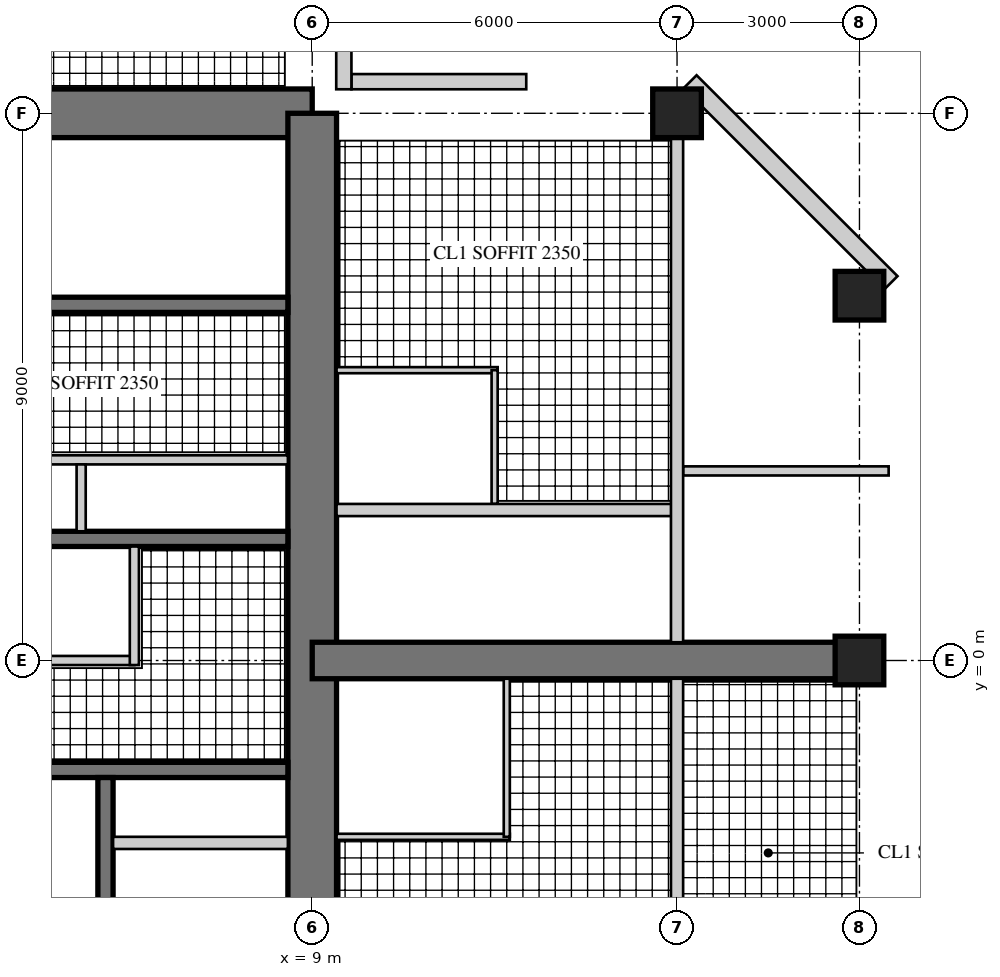
"""IFC4 building model, lengths in metres.
Left out: names, types, materials, properties, quantities, classifications, styles, units other than length and angle.
Written with IfcOpenShell. Run it as: python <this file> out.ifc"""

import sys

from ifc_helpers import new_model, si_unit, direction, frame, frame_2d, origin, origin_2d, place, context, subcontext, project, spatial, rectangle, hollow_rectangle, extrude, element, fill, save


model = new_model("IFC4")
c1 = context("Model", 3, precision=1e-05, world=origin(), true_north=direction((0.0, 1.0)))
c2 = subcontext(c1, "Body", "Model", "MODEL_VIEW")
j1 = project(units=[si_unit("LENGTHUNIT", "METRE"), si_unit("PLANEANGLEUNIT", "RADIAN")], contexts=[c1])
p1 = place(None, origin())
s1 = spatial("IfcSite", under=j1, at=p1, CompositionType="ELEMENT")
p2 = place(p1, origin())
s2 = spatial("IfcBuilding", under=s1, at=p2, CompositionType="ELEMENT")
p3 = place(p2, frame((0.0, 0.0, 225.5)))
s3 = spatial("IfcBuildingStorey", under=s2, at=p3, CompositionType="ELEMENT", Elevation=225.5)
p4 = place(p3, frame((9.0, 9.0, 0.0), z_axis=(0.0, 0.0, 1.0), x_axis=(-1.0, 0.0, 0.0)))
e1 = element("IfcWall", 1, at=p4, inside=s3, PredefinedType="SHEAR", context=c2, shape_type="SweptSolid", body=[
    extrude(rectangle(XDim=18.0, YDim=0.8, at=frame_2d((9.0, 0.0))), origin(), (0.0, 0.0, 1.0), 3.4),
])
p5 = place(p4, frame((9.8, 0.0, 0.0)))
e2 = element("IfcOpeningElement", 2, at=p5, cuts=e1, PredefinedType="OPENING", context=c2, shape_type="SweptSolid", body=[
    extrude(rectangle(XDim=1.0, YDim=2.4, at=frame_2d((0.5, 1.2))), frame((0.0, 0.41, 0.0), z_axis=(0.0, -1.0, 0.0), x_axis=(1.0, 0.0, 0.0)), (0.0, 0.0, 1.0), 0.82),
])
p6 = place(p3, frame((9.0, -9.0, 0.0), z_axis=(0.0, 0.0, 1.0), x_axis=(0.0, 1.0, 0.0)))
e3 = element("IfcWall", 3, at=p6, inside=s3, PredefinedType="SHEAR", context=c2, shape_type="SweptSolid", body=[
    extrude(rectangle(XDim=18.0, YDim=0.8, at=frame_2d((9.0, 0.0))), origin(), (0.0, 0.0, 1.0), 3.4),
])
p7 = place(p6, frame((9.8, 0.0, 0.0)))
e4 = element("IfcOpeningElement", 4, at=p7, cuts=e3, PredefinedType="OPENING", context=c2, shape_type="SweptSolid", body=[
    extrude(rectangle(XDim=1.0, YDim=2.4, at=frame_2d((0.5, 1.2))), frame((0.0, 0.41, 0.0), z_axis=(0.0, -1.0, 0.0), x_axis=(1.0, 0.0, 0.0)), (0.0, 0.0, 1.0), 0.82),
])
p8 = place(p3, frame((1.925, 2.0, 0.0), z_axis=(0.0, 0.0, 1.0), x_axis=(1.0, 0.0, 0.0)))
e5 = element("IfcWall", 5, at=p8, inside=s3, PredefinedType="SHEAR", context=c2, shape_type="SweptSolid", body=[
    extrude(rectangle(XDim=6.675, YDim=0.25, at=frame_2d((3.337, 0.0))), origin(), (0.0, 0.0, 1.0), 3.4),
])
p9 = place(p3, frame((1.925, 5.85, 0.0), z_axis=(0.0, 0.0, 1.0), x_axis=(1.0, 0.0, 0.0)))
e6 = element("IfcWall", 6, at=p9, inside=s3, PredefinedType="SHEAR", context=c2, shape_type="SweptSolid", body=[
    extrude(rectangle(XDim=6.675, YDim=0.25, at=frame_2d((3.337, 0.0))), origin(), (0.0, 0.0, 1.0), 3.4),
])
p10 = place(p9, frame((0.546, 0.0, 0.0)))
e7 = element("IfcOpeningElement", 7, at=p10, cuts=e6, PredefinedType="OPENING", context=c2, shape_type="SweptSolid", body=[
    extrude(rectangle(XDim=1.0, YDim=2.1, at=frame_2d((0.5, 1.05))), frame((0.0, 0.135, 0.0), z_axis=(0.0, -1.0, 0.0), x_axis=(1.0, 0.0, 0.0)), (0.0, 0.0, 1.0), 0.27),
])
p11 = place(p3, frame((1.925, 3.3, 0.0), z_axis=(0.0, 0.0, 1.0), x_axis=(1.0, 0.0, 0.0)))
e8 = element("IfcWall", 8, at=p11, inside=s3, PredefinedType="PARTITIONING", context=c2, shape_type="SweptSolid", body=[
    extrude(rectangle(XDim=6.675, YDim=0.15, at=frame_2d((3.337, 0.0))), origin(), (0.0, 0.0, 1.0), 3.4),
])
p12 = place(p11, frame((0.075, 0.0, 0.0)))
e9 = element("IfcOpeningElement", 9, at=p12, cuts=e8, PredefinedType="OPENING", context=c2, shape_type="SweptSolid", body=[
    extrude(rectangle(XDim=0.8, YDim=2.1, at=frame_2d((0.4, 1.05))), frame((0.0, 0.085, 0.0), z_axis=(0.0, -1.0, 0.0), x_axis=(1.0, 0.0, 0.0)), (0.0, 0.0, 1.0), 0.17),
])
p13 = place(p11, frame((3.675, 0.0, 0.0)))
e10 = element("IfcOpeningElement", 10, at=p13, cuts=e8, PredefinedType="OPENING", context=c2, shape_type="SweptSolid", body=[
    extrude(rectangle(XDim=0.8, YDim=2.1, at=frame_2d((0.4, 1.05))), frame((0.0, 0.085, 0.0), z_axis=(0.0, -1.0, 0.0), x_axis=(1.0, 0.0, 0.0)), (0.0, 0.0, 1.0), 0.17),
])
p14 = place(p3, frame((5.2, 2.125, 0.0), z_axis=(0.0, 0.0, 1.0), x_axis=(0.0, 1.0, 0.0)))
e11 = element("IfcWall", 11, at=p14, inside=s3, PredefinedType="PARTITIONING", context=c2, shape_type="SweptSolid", body=[
    extrude(rectangle(XDim=1.1, YDim=0.15, at=frame_2d((0.55, 0.0))), origin(), (0.0, 0.0, 1.0), 3.4),
])
p15 = place(p3, frame((2.125, -1.8, 0.0), z_axis=(0.0, 0.0, 1.0), x_axis=(1.0, 0.0, 0.0)))
e12 = element("IfcWall", 12, at=p15, inside=s3, PredefinedType="SHEAR", context=c2, shape_type="SweptSolid", body=[
    extrude(rectangle(XDim=6.475, YDim=0.25, at=frame_2d((3.238, 0.0))), origin(), (0.0, 0.0, 1.0), 3.4),
])
p16 = place(p3, frame((5.6, -1.925, 0.0), z_axis=(0.0, 0.0, 1.0), x_axis=(0.0, -1.0, 0.0)))
e13 = element("IfcWall", 13, at=p16, inside=s3, PredefinedType="SHEAR", context=c2, shape_type="SweptSolid", body=[
    extrude(rectangle(XDim=3.55, YDim=0.25, at=frame_2d((1.775, 0.0))), origin(), (0.0, 0.0, 1.0), 3.4),
])
p17 = place(p16, frame((1.525, 0.0, 0.0)))
e14 = element("IfcOpeningElement", 14, at=p17, cuts=e13, PredefinedType="OPENING", context=c2, shape_type="SweptSolid", body=[
    extrude(rectangle(XDim=1.1, YDim=2.2, at=frame_2d((0.55, 1.1))), frame((0.0, 0.135, 0.0), z_axis=(0.0, -1.0, 0.0), x_axis=(1.0, 0.0, 0.0)), (0.0, 0.0, 1.0), 0.27),
])
p18 = place(p16, frame((0.075, 0.0, 0.0)))
e15 = element("IfcOpeningElement", 15, at=p18, cuts=e13, PredefinedType="OPENING", context=c2, shape_type="SweptSolid", body=[
    extrude(rectangle(XDim=0.8, YDim=2.1, at=frame_2d((0.4, 1.05))), frame((0.0, 0.135, 0.0), z_axis=(0.0, -1.0, 0.0), x_axis=(1.0, 0.0, 0.0)), (0.0, 0.0, 1.0), 0.27),
])
p19 = place(p3, frame((5.725, -3.0, 0.0), z_axis=(0.0, 0.0, 1.0), x_axis=(1.0, 0.0, 0.0)))
e16 = element("IfcWall", 16, at=p19, inside=s3, PredefinedType="PARTITIONING", context=c2, shape_type="SweptSolid", body=[
    extrude(rectangle(XDim=2.875, YDim=0.2, at=frame_2d((1.438, 0.0))), origin(), (0.0, 0.0, 1.0), 3.4),
])
p20 = place(p3, frame((9.0, 0.0, 0.0), z_axis=(0.0, 0.0, 1.0), x_axis=(1.0, 0.0, 0.0)))
e17 = element("IfcWall", 17, at=p20, inside=s3, PredefinedType="SHEAR", context=c2, shape_type="SweptSolid", body=[
    extrude(rectangle(XDim=9.0, YDim=0.6, at=frame_2d((4.5, 0.0))), origin(), (0.0, 0.0, 1.0), 3.4),
])
p21 = place(p20, frame((3.8, 0.0, 0.0)))
e18 = element("IfcOpeningElement", 18, at=p21, cuts=e17, PredefinedType="OPENING", context=c2, shape_type="SweptSolid", body=[
    extrude(rectangle(XDim=1.0, YDim=2.15, at=frame_2d((0.5, 1.075))), frame((0.0, 0.31, 0.0), z_axis=(0.0, -1.0, 0.0), x_axis=(1.0, 0.0, 0.0)), (0.0, 0.0, 1.0), 0.62),
])
p22 = place(p20, frame((7.0, 0.0, 0.0)))
e19 = element("IfcOpeningElement", 19, at=p22, cuts=e17, PredefinedType="OPENING", context=c2, shape_type="SweptSolid", body=[
    extrude(rectangle(XDim=1.0, YDim=2.2, at=frame_2d((0.5, 1.1))), frame((0.0, 0.31, 0.0), z_axis=(0.0, -1.0, 0.0), x_axis=(1.0, 0.0, 0.0)), (0.0, 0.0, 1.0), 0.62),
])
for number, where, z_axis, x_axis in (
    (20, (15.0, 9.0, 0.0), (0.0, 0.0, 1.0), (1.0, 0.0, 0.0)),
    (21, (18.0, 0.0, 0.0), (0.0, 0.0, 1.0), (1.0, 0.0, 0.0)),
    (22, (18.0, 6.0, 0.0), (0.0, 0.0, 1.0), (1.0, 0.0, 0.0)),
):
    element("IfcColumn", number, at=place(p3, frame(where, z_axis=z_axis, x_axis=x_axis)), inside=s3, PredefinedType="COLUMN", context=c2, shape_type="SweptSolid", body=[
        extrude(rectangle(XDim=0.8, YDim=0.8, at=origin_2d()), origin(), (0.0, 0.0, 1.0), 3.4),
    ])
p23 = place(p3, frame((18.52, 6.215, 0.0), z_axis=(0.0, 0.0, 1.0), x_axis=(-0.707106781187, 0.707106781187, 0.0)))
e23 = element("IfcWall", 23, at=p23, inside=s3, PredefinedType="SOLIDWALL", context=c2, shape_type="SweptSolid", body=[
    extrude(rectangle(XDim=4.674, YDim=0.3, at=frame_2d((2.337, 0.0))), origin(), (0.0, 0.0, 1.0), 3.22),
])
p24 = place(p23, frame((1.887, 0.0, 0.3)))
e24 = element("IfcOpeningElement", 24, at=p24, cuts=e23, PredefinedType="OPENING", context=c2, shape_type="SweptSolid", body=[
    extrude(rectangle(XDim=0.9, YDim=2.4, at=frame_2d((0.45, 1.2))), frame((0.0, 0.16, 0.0), z_axis=(0.0, -1.0, 0.0), x_axis=(1.0, 0.0, 0.0)), (0.0, 0.0, 1.0), 0.32),
])
p25 = place(p3, frame((12.52, 9.52, 0.0), z_axis=(0.0, 0.0, 1.0), x_axis=(-1.0, 0.0, 0.0)))
e25 = element("IfcWall", 25, at=p25, inside=s3, PredefinedType="SOLIDWALL", context=c2, shape_type="SweptSolid", body=[
    extrude(rectangle(XDim=2.875, YDim=0.25, at=frame_2d((1.438, 0.0))), origin(), (0.0, 0.0, 1.0), 3.22),
])
p26 = place(p25, frame((0.6, 0.0, 0.0)))
e26 = element("IfcOpeningElement", 26, at=p26, cuts=e25, PredefinedType="OPENING", context=c2, shape_type="SweptSolid", body=[
    extrude(rectangle(XDim=1.0, YDim=2.2, at=frame_2d((0.5, 1.1))), frame((0.0, 0.135, 0.0), z_axis=(0.0, -1.0, 0.0), x_axis=(1.0, 0.0, 0.0)), (0.0, 0.0, 1.0), 0.27),
])
p27 = place(p3, frame((9.52, 9.395, 0.0), z_axis=(0.0, 0.0, 1.0), x_axis=(0.0, 1.0, 0.0)))
e27 = element("IfcWall", 27, at=p27, inside=s3, PredefinedType="SOLIDWALL", context=c2, shape_type="SweptSolid", body=[
    extrude(rectangle(XDim=3.125, YDim=0.25, at=frame_2d((1.562, 0.0))), origin(), (0.0, 0.0, 1.0), 3.22),
])
p28 = place(p27, frame((0.6, 0.0, 0.0)))
e28 = element("IfcOpeningElement", 28, at=p28, cuts=e27, PredefinedType="OPENING", context=c2, shape_type="SweptSolid", body=[
    extrude(rectangle(XDim=1.0, YDim=2.2, at=frame_2d((0.5, 1.1))), frame((0.0, 0.135, 0.0), z_axis=(0.0, -1.0, 0.0), x_axis=(1.0, 0.0, 0.0)), (0.0, 0.0, 1.0), 0.27),
])
p29 = place(p3, frame((2.325, 0.0, 0.0), z_axis=(0.0, 0.0, 1.0), x_axis=(1.0, 0.0, 0.0)))
e29 = element("IfcWall", 29, at=p29, inside=s3, PredefinedType="PARTITIONING", context=c2, shape_type="SweptSolid", body=[
    extrude(rectangle(XDim=3.75, YDim=0.15, at=frame_2d((1.875, 0.0))), origin(), (0.0, 0.0, 1.0), 3.22),
])
p30 = place(p29, frame((0.4, 0.0, 0.0)))
e30 = element("IfcOpeningElement", 30, at=p30, cuts=e29, PredefinedType="OPENING", context=c2, shape_type="SweptSolid", body=[
    extrude(rectangle(XDim=1.0, YDim=2.1, at=frame_2d((0.5, 1.05))), frame((0.0, 0.085, 0.0), z_axis=(0.0, -1.0, 0.0), x_axis=(1.0, 0.0, 0.0)), (0.0, 0.0, 1.0), 0.17),
])
p31 = place(p3, frame((6.075, -0.075, 0.0), z_axis=(0.0, 0.0, 1.0), x_axis=(0.0, 1.0, 0.0)))
e31 = element("IfcWall", 31, at=p31, inside=s3, PredefinedType="PARTITIONING", context=c2, shape_type="SweptSolid", body=[
    extrude(rectangle(XDim=1.95, YDim=0.15, at=frame_2d((0.975, 0.0))), origin(), (0.0, 0.0, 1.0), 3.22),
])
p32 = place(p3, frame((9.4, 4.775, 0.0), z_axis=(0.0, 0.0, 1.0), x_axis=(1.0, 0.0, 0.0)))
e32 = element("IfcWall", 32, at=p32, inside=s3, PredefinedType="PARTITIONING", context=c2, shape_type="SweptSolid", body=[
    extrude(rectangle(XDim=2.65, YDim=0.1, at=frame_2d((1.325, 0.0))), origin(), (0.0, 0.0, 1.0), 3.22),
])
p33 = place(p3, frame((12.0, 2.575, 0.0), z_axis=(0.0, 0.0, 1.0), x_axis=(0.0, 1.0, 0.0)))
e33 = element("IfcWall", 33, at=p33, inside=s3, PredefinedType="PARTITIONING", context=c2, shape_type="SweptSolid", body=[
    extrude(rectangle(XDim=2.2, YDim=0.1, at=frame_2d((1.1, 0.0))), origin(), (0.0, 0.0, 1.0), 3.22),
])
p34 = place(p33, frame((0.55, 0.0, 0.0)))
e34 = element("IfcOpeningElement", 34, at=p34, cuts=e33, PredefinedType="OPENING", context=c2, shape_type="SweptSolid", body=[
    extrude(rectangle(XDim=0.9, YDim=2.1, at=frame_2d((0.45, 1.05))), frame((0.0, 0.06, 0.0), z_axis=(0.0, -1.0, 0.0), x_axis=(1.0, 0.0, 0.0)), (0.0, 0.0, 1.0), 0.12),
])
p35 = place(p3, frame((9.4, -2.9, 0.0), z_axis=(0.0, 0.0, 1.0), x_axis=(1.0, 0.0, 0.0)))
e35 = element("IfcWall", 35, at=p35, inside=s3, PredefinedType="PARTITIONING", context=c2, shape_type="SweptSolid", body=[
    extrude(rectangle(XDim=2.85, YDim=0.1, at=frame_2d((1.425, 0.0))), origin(), (0.0, 0.0, 1.0), 3.22),
])
p36 = place(p3, frame((12.2, -2.9, 0.0), z_axis=(0.0, 0.0, 1.0), x_axis=(0.0, 1.0, 0.0)))
e36 = element("IfcWall", 36, at=p36, inside=s3, PredefinedType="PARTITIONING", context=c2, shape_type="SweptSolid", body=[
    extrude(rectangle(XDim=2.6, YDim=0.1, at=frame_2d((1.3, 0.0))), origin(), (0.0, 0.0, 1.0), 3.22),
])
p37 = place(p36, frame((0.55, 0.0, 0.0)))
e37 = element("IfcOpeningElement", 37, at=p37, cuts=e36, PredefinedType="OPENING", context=c2, shape_type="SweptSolid", body=[
    extrude(rectangle(XDim=0.9, YDim=2.1, at=frame_2d((0.45, 1.05))), frame((0.0, 0.06, 0.0), z_axis=(0.0, -1.0, 0.0), x_axis=(1.0, 0.0, 0.0)), (0.0, 0.0, 1.0), 0.12),
])
p38 = place(p3, frame((9.4, 2.475, 0.0), z_axis=(0.0, 0.0, 1.0), x_axis=(1.0, 0.0, 0.0)))
e38 = element("IfcWall", 38, at=p38, inside=s3, PredefinedType="SOLIDWALL", context=c2, shape_type="SweptSolid", body=[
    extrude(rectangle(XDim=5.6, YDim=0.2, at=frame_2d((2.8, 0.0))), origin(), (0.0, 0.0, 1.0), 3.22),
])
p39 = place(p38, frame((3.4, 0.0, 0.0)))
e39 = element("IfcOpeningElement", 39, at=p39, cuts=e38, PredefinedType="OPENING", context=c2, shape_type="SweptSolid", body=[
    extrude(rectangle(XDim=1.0, YDim=2.15, at=frame_2d((0.5, 1.075))), frame((0.0, 0.11, 0.0), z_axis=(0.0, -1.0, 0.0), x_axis=(1.0, 0.0, 0.0)), (0.0, 0.0, 1.0), 0.22),
])
p40 = place(p3, frame((15.1, 3.118, 0.0), z_axis=(0.0, 0.0, 1.0), x_axis=(1.0, 0.0, 0.0)))
e40 = element("IfcWall", 40, at=p40, inside=s3, PredefinedType="PARTITIONING", context=c2, shape_type="SweptSolid", body=[
    extrude(rectangle(XDim=3.38, YDim=0.15, at=frame_2d((1.69, 0.0))), origin(), (0.0, 0.0, 1.0), 3.22),
])
p41 = place(p40, frame((0.6, 0.0, 0.0)))
e41 = element("IfcOpeningElement", 41, at=p41, cuts=e40, PredefinedType="OPENING", context=c2, shape_type="SweptSolid", body=[
    extrude(rectangle(XDim=1.0, YDim=2.1, at=frame_2d((0.5, 1.05))), frame((0.0, 0.085, 0.0), z_axis=(0.0, -1.0, 0.0), x_axis=(1.0, 0.0, 0.0)), (0.0, 0.0, 1.0), 0.17),
])
p42 = place(p3, frame((15.0, -8.6, 0.0), z_axis=(0.0, 0.0, 1.0), x_axis=(0.0, 1.0, 0.0)))
e42 = element("IfcWall", 42, at=p42, inside=s3, PredefinedType="SOLIDWALL", context=c2, shape_type="SweptSolid", body=[
    extrude(rectangle(XDim=8.3, YDim=0.2, at=frame_2d((4.15, 0.0))), origin(), (0.0, 0.0, 1.0), 2.52),
])
p43 = place(p3, frame((15.0, 0.3, 0.0), z_axis=(0.0, 0.0, 1.0), x_axis=(0.0, 1.0, 0.0)))
e43 = element("IfcWall", 43, at=p43, inside=s3, PredefinedType="SOLIDWALL", context=c2, shape_type="SweptSolid", body=[
    extrude(rectangle(XDim=8.3, YDim=0.2, at=frame_2d((4.15, 0.0))), origin(), (0.0, 0.0, 1.0), 2.52),
])
p44 = place(p43, frame((0.45, 0.0, 0.0)))
e44 = element("IfcOpeningElement", 44, at=p44, cuts=e43, PredefinedType="OPENING", context=c2, shape_type="SweptSolid", body=[
    extrude(rectangle(XDim=1.0, YDim=2.2, at=frame_2d((0.5, 1.1))), frame((0.0, 0.11, 0.0), z_axis=(0.0, -1.0, 0.0), x_axis=(1.0, 0.0, 0.0)), (0.0, 0.0, 1.0), 0.22),
])
p45 = place(p24, origin())
e45 = element("IfcWindow", 45, at=p45, inside=s3, PartitioningType="SINGLE_PANEL", PredefinedType="WINDOW", context=c2, shape_type="SweptSolid", body=[
    extrude(hollow_rectangle(XDim=0.9, YDim=2.4, WallThickness=0.06, at=frame_2d((0.45, 1.2))), frame((0.0, 0.03, 0.0), z_axis=(0.0, -1.0, 0.0), x_axis=(1.0, 0.0, 0.0)), (0.0, 0.0, 1.0), 0.06),
    extrude(rectangle(XDim=0.779, YDim=2.279, at=frame_2d((0.45, 1.2))), frame((0.0, 0.03, 0.0), z_axis=(0.0, -1.0, 0.0), x_axis=(1.0, 0.0, 0.0)), (0.0, 0.0, 1.0), 0.06),
])
fill(e24, e45)
p46 = place(p26, origin())
e46 = element("IfcDoor", 46, at=p46, inside=s3, OperationType="SINGLE_SWING_RIGHT", PredefinedType="DOOR", context=c2, shape_type="SweptSolid", body=[
    extrude(hollow_rectangle(XDim=1.0, YDim=2.2, WallThickness=0.06, at=frame_2d((0.5, 1.1))), frame((0.0, 0.025, 0.0), z_axis=(0.0, -1.0, 0.0), x_axis=(1.0, 0.0, 0.0)), (0.0, 0.0, 1.0), 0.05),
    extrude(rectangle(XDim=0.879, YDim=2.079, at=frame_2d((0.5, 1.1))), frame((0.0, 0.025, 0.0), z_axis=(0.0, -1.0, 0.0), x_axis=(1.0, 0.0, 0.0)), (0.0, 0.0, 1.0), 0.05),
])
fill(e26, e46)
p47 = place(p28, origin())
e47 = element("IfcDoor", 47, at=p47, inside=s3, OperationType="SINGLE_SWING_LEFT", PredefinedType="DOOR", context=c2, shape_type="SweptSolid", body=[
    extrude(hollow_rectangle(XDim=1.0, YDim=2.2, WallThickness=0.06, at=frame_2d((0.5, 1.1))), frame((0.0, 0.025, 0.0), z_axis=(0.0, -1.0, 0.0), x_axis=(1.0, 0.0, 0.0)), (0.0, 0.0, 1.0), 0.05),
    extrude(rectangle(XDim=0.879, YDim=2.079, at=frame_2d((0.5, 1.1))), frame((0.0, 0.025, 0.0), z_axis=(0.0, -1.0, 0.0), x_axis=(1.0, 0.0, 0.0)), (0.0, 0.0, 1.0), 0.05),
])
fill(e28, e47)
p48 = place(p34, origin())
e48 = element("IfcDoor", 48, at=p48, inside=s3, OperationType="SINGLE_SWING_LEFT", PredefinedType="DOOR", context=c2, shape_type="SweptSolid", body=[
    extrude(rectangle(XDim=0.9, YDim=2.1, at=frame_2d((0.45, 1.05))), frame((0.0, 0.025, 0.0), z_axis=(0.0, -1.0, 0.0), x_axis=(1.0, 0.0, 0.0)), (0.0, 0.0, 1.0), 0.05),
])
fill(e34, e48)
p49 = place(p37, origin())
e49 = element("IfcDoor", 49, at=p49, inside=s3, OperationType="SINGLE_SWING_LEFT", PredefinedType="DOOR", context=c2, shape_type="SweptSolid", body=[
    extrude(rectangle(XDim=0.9, YDim=2.1, at=frame_2d((0.45, 1.05))), frame((0.0, 0.025, 0.0), z_axis=(0.0, -1.0, 0.0), x_axis=(1.0, 0.0, 0.0)), (0.0, 0.0, 1.0), 0.05),
])
fill(e37, e49)
p50 = place(p39, origin())
e50 = element("IfcDoor", 50, at=p50, inside=s3, OperationType="SINGLE_SWING_LEFT", PredefinedType="DOOR", context=c2, shape_type="SweptSolid", body=[
    extrude(rectangle(XDim=1.0, YDim=2.15, at=frame_2d((0.5, 1.075))), frame((0.0, 0.025, 0.0), z_axis=(0.0, -1.0, 0.0), x_axis=(1.0, 0.0, 0.0)), (0.0, 0.0, 1.0), 0.05),
])
fill(e39, e50)
p51 = place(p41, frame((1.0, 0.0, 0.0), z_axis=(0.0, 0.0, 1.0), x_axis=(-1.0, 0.0, 0.0)))
e51 = element("IfcDoor", 51, at=p51, inside=s3, OperationType="SINGLE_SWING_RIGHT", PredefinedType="DOOR", context=c2, shape_type="SweptSolid", body=[
    extrude(rectangle(XDim=1.0, YDim=2.1, at=frame_2d((0.5, 1.05))), frame((0.0, 0.025, 0.0), z_axis=(0.0, -1.0, 0.0), x_axis=(1.0, 0.0, 0.0)), (0.0, 0.0, 1.0), 0.05),
])
fill(e41, e51)
p52 = place(p44, frame((1.0, 0.0, 0.0), z_axis=(0.0, 0.0, 1.0), x_axis=(-1.0, 0.0, 0.0)))
e52 = element("IfcDoor", 52, at=p52, inside=s3, OperationType="SINGLE_SWING_LEFT", PredefinedType="DOOR", context=c2, shape_type="SweptSolid", body=[
    extrude(rectangle(XDim=1.0, YDim=2.2, at=frame_2d((0.5, 1.1))), frame((0.0, 0.025, 0.0), z_axis=(0.0, -1.0, 0.0), x_axis=(1.0, 0.0, 0.0)), (0.0, 0.0, 1.0), 0.05),
])
fill(e44, e52)
p53 = place(p21, frame((1.0, 0.0, 0.0), z_axis=(0.0, 0.0, 1.0), x_axis=(-1.0, 0.0, 0.0)))
e53 = element("IfcDoor", 53, at=p53, inside=s3, OperationType="SINGLE_SWING_RIGHT", PredefinedType="DOOR", context=c2, shape_type="SweptSolid", body=[
    extrude(rectangle(XDim=1.0, YDim=2.15, at=frame_2d((0.5, 1.075))), frame((0.0, 0.025, 0.0), z_axis=(0.0, -1.0, 0.0), x_axis=(1.0, 0.0, 0.0)), (0.0, 0.0, 1.0), 0.05),
])
fill(e18, e53)
p54 = place(p22, origin())
e54 = element("IfcDoor", 54, at=p54, inside=s3, OperationType="SINGLE_SWING_LEFT", PredefinedType="DOOR", context=c2, shape_type="SweptSolid", body=[
    extrude(rectangle(XDim=1.0, YDim=2.2, at=frame_2d((0.5, 1.1))), frame((0.0, 0.025, 0.0), z_axis=(0.0, -1.0, 0.0), x_axis=(1.0, 0.0, 0.0)), (0.0, 0.0, 1.0), 0.05),
])
fill(e19, e54)
p55 = place(p7, origin())
e55 = element("IfcDoor", 55, at=p55, inside=s3, OperationType="SINGLE_SWING_RIGHT", PredefinedType="DOOR", context=c2, shape_type="SweptSolid", body=[
    extrude(rectangle(XDim=1.0, YDim=2.4, at=frame_2d((0.5, 1.2))), frame((0.0, 0.055, 0.0), z_axis=(0.0, -1.0, 0.0), x_axis=(1.0, 0.0, 0.0)), (0.0, 0.0, 1.0), 0.05),
])
fill(e4, e55)
p56 = place(p13, frame((0.8, 0.0, 0.0), z_axis=(0.0, 0.0, 1.0), x_axis=(-1.0, 0.0, 0.0)))
e56 = element("IfcDoor", 56, at=p56, inside=s3, OperationType="SINGLE_SWING_RIGHT", PredefinedType="DOOR", context=c2, shape_type="SweptSolid", body=[
    extrude(rectangle(XDim=0.8, YDim=2.1, at=frame_2d((0.4, 1.05))), frame((0.0, 0.025, 0.0), z_axis=(0.0, -1.0, 0.0), x_axis=(1.0, 0.0, 0.0)), (0.0, 0.0, 1.0), 0.05),
])
fill(e10, e56)
p57 = place(p17, origin())
e57 = element("IfcDoor", 57, at=p57, inside=s3, OperationType="DOUBLE_DOOR_SLIDING", PredefinedType="DOOR", context=c2, shape_type="SweptSolid", body=[
    extrude(rectangle(XDim=1.1, YDim=2.2, at=frame_2d((0.55, 1.1))), frame((0.0, 0.025, 0.0), z_axis=(0.0, -1.0, 0.0), x_axis=(1.0, 0.0, 0.0)), (0.0, 0.0, 1.0), 0.05),
])
fill(e14, e57)
p58 = place(p18, origin())
e58 = element("IfcDoor", 58, at=p58, inside=s3, OperationType="SINGLE_SWING_LEFT", PredefinedType="DOOR", context=c2, shape_type="SweptSolid", body=[
    extrude(rectangle(XDim=0.8, YDim=2.1, at=frame_2d((0.4, 1.05))), frame((0.0, 0.025, 0.0), z_axis=(0.0, -1.0, 0.0), x_axis=(1.0, 0.0, 0.0)), (0.0, 0.0, 1.0), 0.05),
])
fill(e15, e58)
save(model, sys.argv[1])
